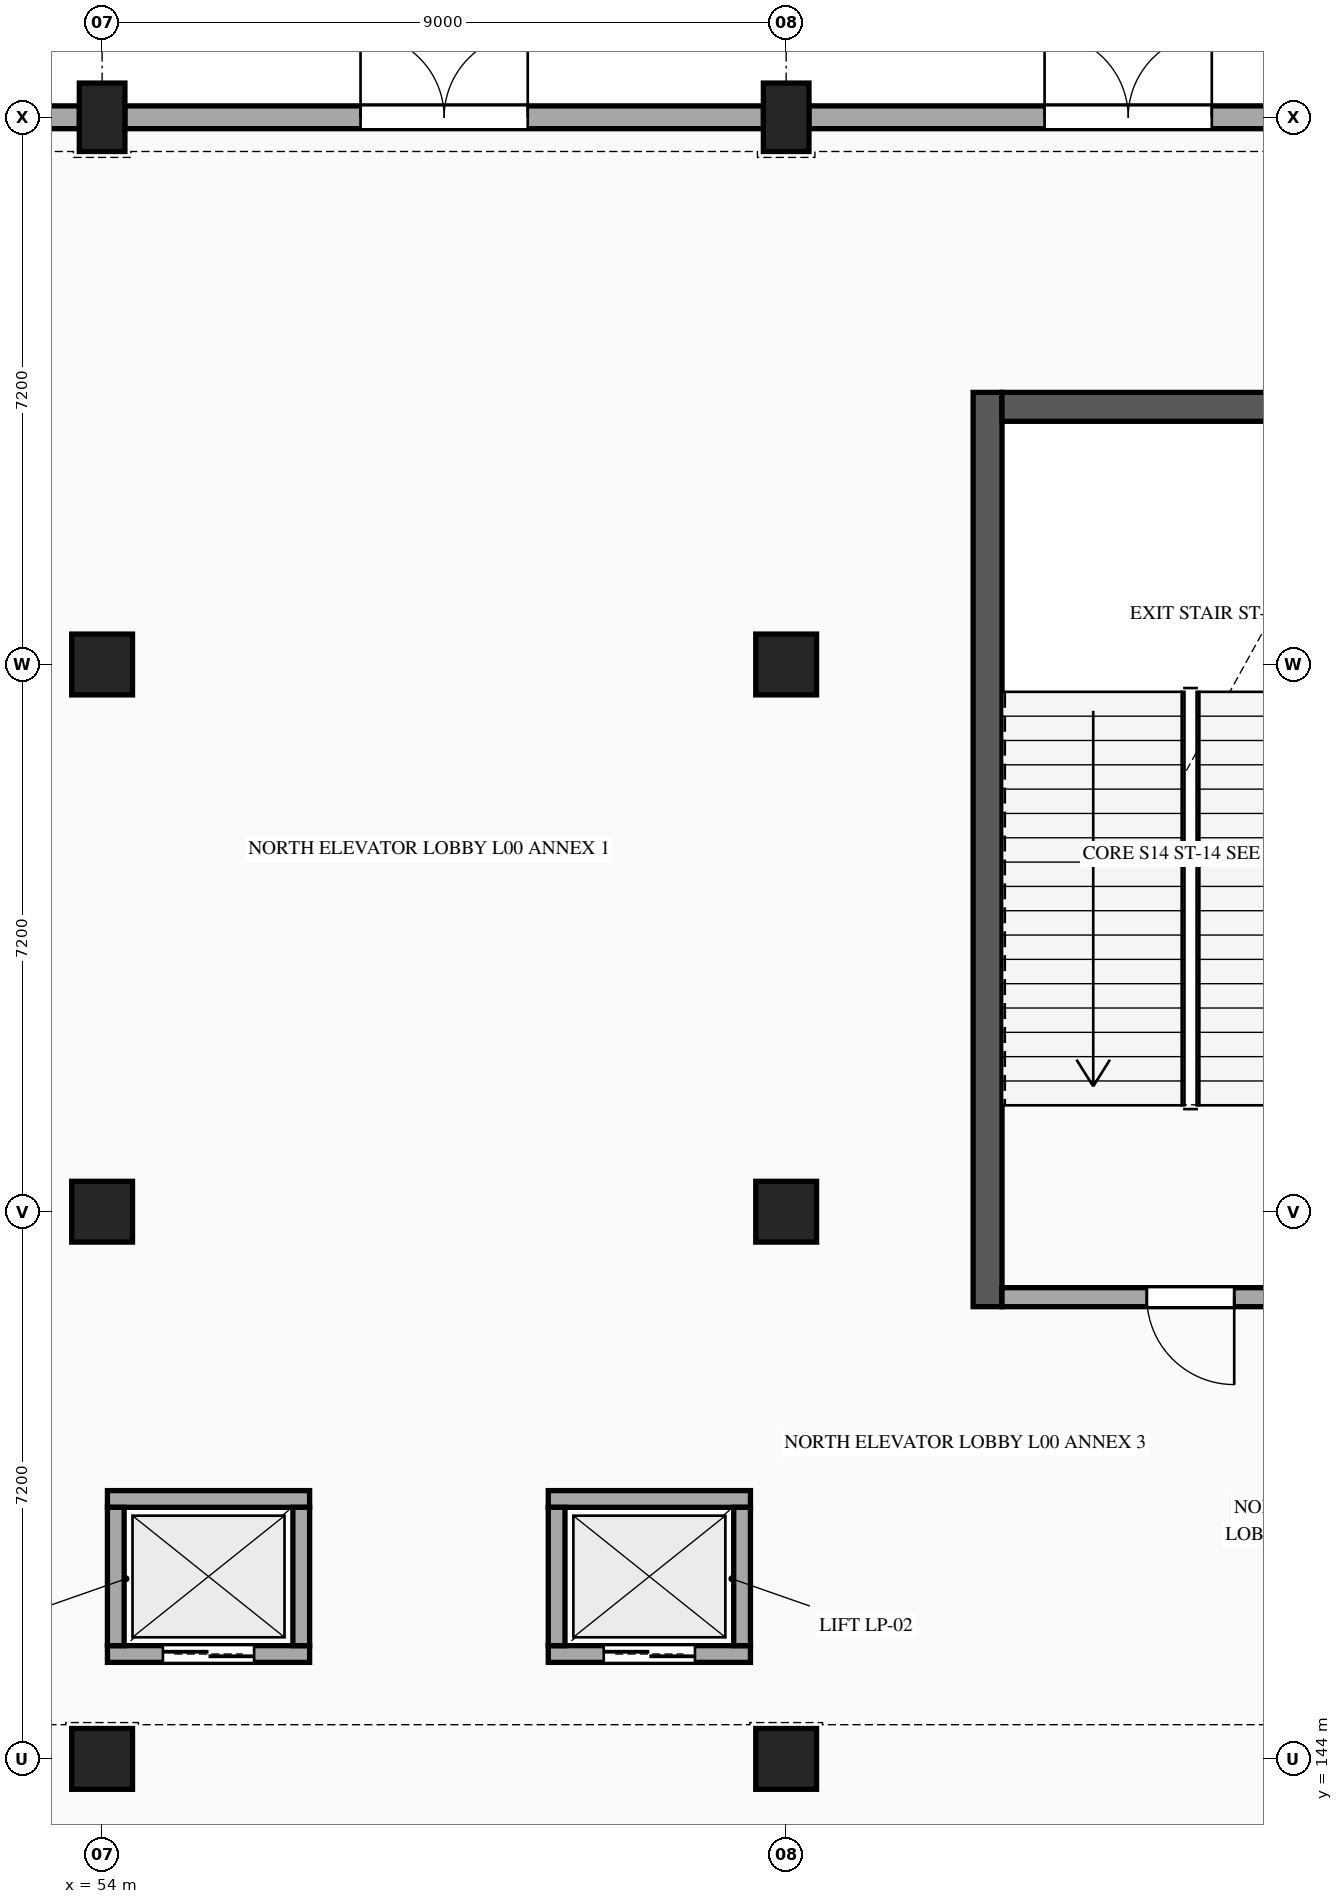
"""IFC4 building model, lengths in metres.
Left out: names, types, materials, properties, quantities, classifications, styles, units other than length and angle.
Written with IfcOpenShell. Run it as: python <this file> out.ifc"""

import sys

from ifc_helpers import new_model, si_unit, direction, frame, frame_2d, origin, origin_2d, place, context, subcontext, project, spatial, rectangle, extrude, element, fill, save


model = new_model("IFC4")
c1 = context("Model", 3, precision=1e-05, world=origin(), true_north=direction((0.0, 1.0)))
c2 = subcontext(c1, "Body", "Model", "MODEL_VIEW")
j1 = project(units=[si_unit("LENGTHUNIT", "METRE"), si_unit("PLANEANGLEUNIT", "RADIAN")], contexts=[c1])
p1 = place(None, origin())
s1 = spatial("IfcSite", under=j1, at=p1, CompositionType="ELEMENT")
p2 = place(p1, origin())
s2 = spatial("IfcBuilding", under=s1, at=p2, CompositionType="ELEMENT")
p3 = place(p2, origin())
s3 = spatial("IfcBuildingStorey", under=s2, at=p3, CompositionType="ELEMENT", Elevation=0.0)
for number, where, z_axis, x_axis in (
    (1, (54.0, 144.0, 0.0), (0.0, 0.0, 1.0), (1.0, 0.0, 0.0)),
    (2, (54.0, 151.2, 0.0), (0.0, 0.0, 1.0), (1.0, 0.0, 0.0)),
    (3, (54.0, 158.4, 0.0), (0.0, 0.0, 1.0), (1.0, 0.0, 0.0)),
):
    element("IfcColumn", number, at=place(p3, frame(where, z_axis=z_axis, x_axis=x_axis)), inside=s3, PredefinedType="COLUMN", context=c2, shape_type="SweptSolid", body=[
        extrude(rectangle(XDim=0.8, YDim=0.8, at=origin_2d()), origin(), (0.0, 0.0, 1.0), 5.4),
    ])
p4 = place(p3, frame((54.0, 165.6, 0.0), z_axis=(0.0, 0.0, 1.0), x_axis=(1.0, 0.0, 0.0)))
e4 = element("IfcColumn", 4, at=p4, inside=s3, PredefinedType="COLUMN", context=c2, shape_type="SweptSolid", body=[
    extrude(rectangle(XDim=0.6, YDim=0.9, at=origin_2d()), origin(), (0.0, 0.0, 1.0), 5.4),
])
for number, where, z_axis, x_axis in (
    (5, (63.0, 144.0, 0.0), (0.0, 0.0, 1.0), (1.0, 0.0, 0.0)),
    (6, (63.0, 151.2, 0.0), (0.0, 0.0, 1.0), (1.0, 0.0, 0.0)),
    (7, (63.0, 158.4, 0.0), (0.0, 0.0, 1.0), (1.0, 0.0, 0.0)),
):
    element("IfcColumn", number, at=place(p3, frame(where, z_axis=z_axis, x_axis=x_axis)), inside=s3, PredefinedType="COLUMN", context=c2, shape_type="SweptSolid", body=[
        extrude(rectangle(XDim=0.8, YDim=0.8, at=origin_2d()), origin(), (0.0, 0.0, 1.0), 5.4),
    ])
p5 = place(p3, frame((63.0, 165.6, 0.0), z_axis=(0.0, 0.0, 1.0), x_axis=(1.0, 0.0, 0.0)))
e8 = element("IfcColumn", 8, at=p5, inside=s3, PredefinedType="COLUMN", context=c2, shape_type="SweptSolid", body=[
    extrude(rectangle(XDim=0.6, YDim=0.9, at=origin_2d()), origin(), (0.0, 0.0, 1.0), 5.4),
])
p6 = place(p3, frame((65.65, 149.95, 0.0), z_axis=(0.0, 0.0, 1.0), x_axis=(0.0, 1.0, 0.0)))
e9 = element("IfcWall", 9, at=p6, inside=s3, PredefinedType="SHEAR", context=c2, shape_type="SweptSolid", body=[
    extrude(rectangle(XDim=12.03, YDim=0.38, at=frame_2d((6.015, 0.0))), origin(), (0.0, 0.0, 1.0), 5.12),
])
p7 = place(p3, frame((65.84, 161.79, 0.0), z_axis=(0.0, 0.0, 1.0), x_axis=(1.0, 0.0, 0.0)))
e10 = element("IfcWall", 10, at=p7, inside=s3, PredefinedType="SHEAR", context=c2, shape_type="SweptSolid", body=[
    extrude(rectangle(XDim=4.96, YDim=0.38, at=frame_2d((2.48, 0.0))), origin(), (0.0, 0.0, 1.0), 5.12),
])
p8 = place(p3, frame((45.298, 165.6, 0.0), z_axis=(0.0, 0.0, 1.0), x_axis=(1.0, 0.0, 0.0)))
e11 = element("IfcWall", 11, at=p8, inside=s3, PredefinedType="STANDARD", context=c2, shape_type="SweptSolid", body=[
    extrude(rectangle(XDim=8.404, YDim=0.3, at=frame_2d((4.202, 0.0))), origin(), (0.0, 0.0, 1.0), 4.653),
])
p9 = place(p8, frame((3.102, 0.0, 0.0)))
e12 = element("IfcOpeningElement", 12, at=p9, cuts=e11, PredefinedType="OPENING", context=c2, shape_type="SweptSolid", body=[
    extrude(rectangle(XDim=2.2, YDim=2.4, at=frame_2d((1.1, 1.2))), frame((0.0, 0.16, 0.0), z_axis=(0.0, -1.0, 0.0), x_axis=(1.0, 0.0, 0.0)), (0.0, 0.0, 1.0), 0.32),
])
p10 = place(p3, frame((54.298, 165.6, 0.0), z_axis=(0.0, 0.0, 1.0), x_axis=(1.0, 0.0, 0.0)))
e13 = element("IfcWall", 13, at=p10, inside=s3, PredefinedType="STANDARD", context=c2, shape_type="SweptSolid", body=[
    extrude(rectangle(XDim=8.404, YDim=0.3, at=frame_2d((4.202, 0.0))), origin(), (0.0, 0.0, 1.0), 4.663),
])
p11 = place(p10, frame((3.102, 0.0, 0.0)))
e14 = element("IfcOpeningElement", 14, at=p11, cuts=e13, PredefinedType="OPENING", context=c2, shape_type="SweptSolid", body=[
    extrude(rectangle(XDim=2.2, YDim=2.4, at=frame_2d((1.1, 1.2))), frame((0.0, 0.16, 0.0), z_axis=(0.0, -1.0, 0.0), x_axis=(1.0, 0.0, 0.0)), (0.0, 0.0, 1.0), 0.32),
])
p12 = place(p3, frame((63.298, 165.6, 0.0), z_axis=(0.0, 0.0, 1.0), x_axis=(1.0, 0.0, 0.0)))
e15 = element("IfcWall", 15, at=p12, inside=s3, PredefinedType="STANDARD", context=c2, shape_type="SweptSolid", body=[
    extrude(rectangle(XDim=8.404, YDim=0.3, at=frame_2d((4.202, 0.0))), origin(), (0.0, 0.0, 1.0), 4.747),
])
p13 = place(p12, frame((3.102, 0.0, 0.0)))
e16 = element("IfcOpeningElement", 16, at=p13, cuts=e15, PredefinedType="OPENING", context=c2, shape_type="SweptSolid", body=[
    extrude(rectangle(XDim=2.2, YDim=2.4, at=frame_2d((1.1, 1.2))), frame((0.0, 0.16, 0.0), z_axis=(0.0, -1.0, 0.0), x_axis=(1.0, 0.0, 0.0)), (0.0, 0.0, 1.0), 0.32),
])
p14 = place(p3, frame((54.07, 145.38, 0.0), z_axis=(0.0, 0.0, 1.0), x_axis=(1.0, 0.0, 0.0)))
e17 = element("IfcWall", 17, at=p14, inside=s3, PredefinedType="STANDARD", context=c2, shape_type="SweptSolid", body=[
    extrude(rectangle(XDim=2.66, YDim=0.22, at=frame_2d((1.33, 0.0))), origin(), (0.0, 0.0, 1.0), 4.437),
])
p15 = place(p14, frame((0.73, 0.0, 0.0)))
e18 = element("IfcOpeningElement", 18, at=p15, cuts=e17, PredefinedType="OPENING", context=c2, shape_type="SweptSolid", body=[
    extrude(rectangle(XDim=1.2, YDim=2.2, at=frame_2d((0.6, 1.1))), frame((0.0, 0.12, 0.0), z_axis=(0.0, -1.0, 0.0), x_axis=(1.0, 0.0, 0.0)), (0.0, 0.0, 1.0), 0.24),
])
p16 = place(p3, frame((56.73, 147.42, 0.0), z_axis=(0.0, 0.0, 1.0), x_axis=(-1.0, 0.0, 0.0)))
e19 = element("IfcWall", 19, at=p16, inside=s3, PredefinedType="STANDARD", context=c2, shape_type="SweptSolid", body=[
    extrude(rectangle(XDim=2.66, YDim=0.22, at=frame_2d((1.33, 0.0))), origin(), (0.0, 0.0, 1.0), 4.437),
])
for number, where, z_axis, x_axis in (
    (20, (54.18, 147.31, 0.0), (0.0, 0.0, 1.0), (0.0, -1.0, 0.0)),
    (21, (56.62, 145.49, 0.0), (0.0, 0.0, 1.0), (0.0, 1.0, 0.0)),
):
    element("IfcWall", number, at=place(p3, frame(where, z_axis=z_axis, x_axis=x_axis)), inside=s3, PredefinedType="STANDARD", context=c2, shape_type="SweptSolid", body=[
        extrude(rectangle(XDim=1.82, YDim=0.22, at=frame_2d((0.91, 0.0))), origin(), (0.0, 0.0, 1.0), 4.437),
    ])
p17 = place(p3, frame((59.87, 145.38, 0.0), z_axis=(0.0, 0.0, 1.0), x_axis=(1.0, 0.0, 0.0)))
e22 = element("IfcWall", 22, at=p17, inside=s3, PredefinedType="STANDARD", context=c2, shape_type="SweptSolid", body=[
    extrude(rectangle(XDim=2.66, YDim=0.22, at=frame_2d((1.33, 0.0))), origin(), (0.0, 0.0, 1.0), 5.08),
])
p18 = place(p17, frame((0.73, 0.0, 0.0)))
e23 = element("IfcOpeningElement", 23, at=p18, cuts=e22, PredefinedType="OPENING", context=c2, shape_type="SweptSolid", body=[
    extrude(rectangle(XDim=1.2, YDim=2.2, at=frame_2d((0.6, 1.1))), frame((0.0, 0.12, 0.0), z_axis=(0.0, -1.0, 0.0), x_axis=(1.0, 0.0, 0.0)), (0.0, 0.0, 1.0), 0.24),
])
p19 = place(p3, frame((62.53, 147.42, 0.0), z_axis=(0.0, 0.0, 1.0), x_axis=(-1.0, 0.0, 0.0)))
e24 = element("IfcWall", 24, at=p19, inside=s3, PredefinedType="STANDARD", context=c2, shape_type="SweptSolid", body=[
    extrude(rectangle(XDim=2.66, YDim=0.22, at=frame_2d((1.33, 0.0))), origin(), (0.0, 0.0, 1.0), 5.08),
])
for number, where, z_axis, x_axis in (
    (25, (59.98, 147.31, 0.0), (0.0, 0.0, 1.0), (0.0, -1.0, 0.0)),
    (26, (62.42, 145.49, 0.0), (0.0, 0.0, 1.0), (0.0, 1.0, 0.0)),
):
    element("IfcWall", number, at=place(p3, frame(where, z_axis=z_axis, x_axis=x_axis)), inside=s3, PredefinedType="STANDARD", context=c2, shape_type="SweptSolid", body=[
        extrude(rectangle(XDim=1.82, YDim=0.22, at=frame_2d((0.91, 0.0))), origin(), (0.0, 0.0, 1.0), 5.08),
    ])
p20 = place(p3, frame((70.8, 150.075, 0.0), z_axis=(0.0, 0.0, 1.0), x_axis=(-1.0, 0.0, 0.0)))
e27 = element("IfcWall", 27, at=p20, inside=s3, PredefinedType="STANDARD", context=c2, shape_type="SweptSolid", body=[
    extrude(rectangle(XDim=4.96, YDim=0.25, at=frame_2d((2.48, 0.0))), origin(), (0.0, 0.0, 1.0), 5.08),
])
p21 = place(p20, frame((1.905, 0.0, 0.0)))
e28 = element("IfcOpeningElement", 28, at=p21, cuts=e27, PredefinedType="OPENING", context=c2, shape_type="SweptSolid", body=[
    extrude(rectangle(XDim=1.15, YDim=2.2, at=frame_2d((0.575, 1.1))), frame((0.0, 0.135, 0.0), z_axis=(0.0, -1.0, 0.0), x_axis=(1.0, 0.0, 0.0)), (0.0, 0.0, 1.0), 0.27),
])
p22 = place(p11, origin())
e29 = element("IfcDoor", 29, at=p22, inside=s3, OperationType="DOUBLE_DOOR_SINGLE_SWING", PredefinedType="DOOR", context=c2, shape_type="SweptSolid", body=[
    extrude(rectangle(XDim=2.2, YDim=2.4, at=frame_2d((1.1, 1.2))), frame((0.0, 0.025, 0.0), z_axis=(0.0, -1.0, 0.0), x_axis=(1.0, 0.0, 0.0)), (0.0, 0.0, 1.0), 0.05),
])
fill(e14, e29)
p23 = place(p13, origin())
e30 = element("IfcDoor", 30, at=p23, inside=s3, OperationType="DOUBLE_DOOR_SINGLE_SWING", PredefinedType="DOOR", context=c2, shape_type="SweptSolid", body=[
    extrude(rectangle(XDim=2.2, YDim=2.4, at=frame_2d((1.1, 1.2))), frame((0.0, 0.025, 0.0), z_axis=(0.0, -1.0, 0.0), x_axis=(1.0, 0.0, 0.0)), (0.0, 0.0, 1.0), 0.05),
])
fill(e16, e30)
p24 = place(p15, origin())
e31 = element("IfcDoor", 31, at=p24, inside=s3, OperationType="DOUBLE_DOOR_SLIDING", PredefinedType="DOOR", context=c2, shape_type="SweptSolid", body=[
    extrude(rectangle(XDim=1.2, YDim=2.2, at=frame_2d((0.6, 1.1))), frame((0.0, 0.025, 0.0), z_axis=(0.0, -1.0, 0.0), x_axis=(1.0, 0.0, 0.0)), (0.0, 0.0, 1.0), 0.05),
])
fill(e18, e31)
p25 = place(p18, origin())
e32 = element("IfcDoor", 32, at=p25, inside=s3, OperationType="DOUBLE_DOOR_SLIDING", PredefinedType="DOOR", context=c2, shape_type="SweptSolid", body=[
    extrude(rectangle(XDim=1.2, YDim=2.2, at=frame_2d((0.6, 1.1))), frame((0.0, 0.025, 0.0), z_axis=(0.0, -1.0, 0.0), x_axis=(1.0, 0.0, 0.0)), (0.0, 0.0, 1.0), 0.05),
])
fill(e23, e32)
p26 = place(p21, origin())
e33 = element("IfcDoor", 33, at=p26, inside=s3, OperationType="SINGLE_SWING_LEFT", PredefinedType="DOOR", context=c2, shape_type="SweptSolid", body=[
    extrude(rectangle(XDim=1.15, YDim=2.2, at=frame_2d((0.575, 1.1))), frame((0.0, 0.025, 0.0), z_axis=(0.0, -1.0, 0.0), x_axis=(1.0, 0.0, 0.0)), (0.0, 0.0, 1.0), 0.05),
])
fill(e28, e33)
save(model, sys.argv[1])
